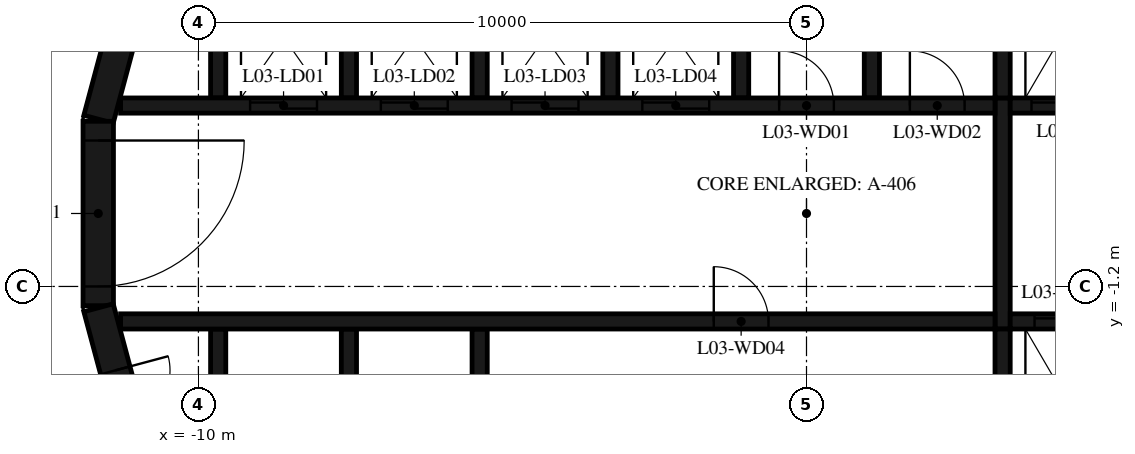
"""IFC4 building model, lengths in metres.
Left out: names, types, materials, properties, quantities, classifications, styles, units other than length and angle.
Written with IfcOpenShell. Run it as: python <this file> out.ifc"""

import sys

from ifc_helpers import new_model, si_unit, direction, frame, frame_2d, origin, place, context, subcontext, project, spatial, polyline, rectangle, outline, extrude, element, fill, save


model = new_model("IFC4")
c1 = context("Model", 3, precision=1e-05, world=origin(), true_north=direction((0.0, 1.0)))
c2 = subcontext(c1, "Body", "Model", "MODEL_VIEW")
j1 = project(units=[si_unit("LENGTHUNIT", "METRE"), si_unit("PLANEANGLEUNIT", "RADIAN")], contexts=[c1])
p1 = place(None, origin())
s1 = spatial("IfcSite", under=j1, at=p1, CompositionType="ELEMENT")
p2 = place(p1, origin())
s2 = spatial("IfcBuilding", under=s1, at=p2, CompositionType="ELEMENT")
p3 = place(p2, frame((0.0, 0.0, 18.6)))
s3 = spatial("IfcBuildingStorey", under=s2, at=p3, CompositionType="ELEMENT", Elevation=18.6)
p4 = place(p3, frame((-10.858, 4.479, 0.0), z_axis=(0.0, 0.0, 1.0), x_axis=(-0.258734743916, -0.965948410781, 0.0)))
e1 = element("IfcWall", 1, at=p4, inside=s3, PredefinedType="SHEAR", context=c2, shape_type="SweptSolid", body=[
    extrude(rectangle(XDim=3.033, YDim=0.5, at=frame_2d((1.516, 0.0))), origin(), (0.0, 0.0, 1.0), 4.42),
])
p5 = place(p3, frame((-11.647, 1.516, 0.0), z_axis=(0.0, 0.0, 1.0), x_axis=(0.0, -1.0, 0.0)))
e2 = element("IfcWall", 2, at=p5, inside=s3, PredefinedType="SHEAR", context=c2, shape_type="SweptSolid", body=[
    extrude(rectangle(XDim=3.033, YDim=0.5, at=frame_2d((1.516, 0.0))), origin(), (0.0, 0.0, 1.0), 4.42),
])
p6 = place(p5, frame((0.316, 0.0, 0.0)))
e3 = element("IfcOpeningElement", 3, at=p6, cuts=e2, PredefinedType="OPENING", context=c2, shape_type="SweptSolid", body=[
    extrude(rectangle(XDim=2.4, YDim=2.1, at=frame_2d((1.2, 1.05))), frame((0.0, 0.26, 0.0), z_axis=(0.0, -1.0, 0.0), x_axis=(1.0, 0.0, 0.0)), (0.0, 0.0, 1.0), 0.52),
])
p7 = place(p3, frame((-11.643, -1.55, 0.0), z_axis=(0.0, 0.0, 1.0), x_axis=(0.258734743916, -0.965948410781, 0.0)))
e4 = element("IfcWall", 4, at=p7, inside=s3, PredefinedType="SHEAR", context=c2, shape_type="SweptSolid", body=[
    extrude(rectangle(XDim=3.033, YDim=0.5, at=frame_2d((1.516, 0.0))), origin(), (0.0, 0.0, 1.0), 4.42),
])
p8 = place(p7, frame((1.066, 0.0, 0.0)))
e5 = element("IfcOpeningElement", 5, at=p8, cuts=e4, PredefinedType="OPENING", context=c2, shape_type="SweptSolid", body=[
    extrude(rectangle(XDim=0.9, YDim=2.1, at=frame_2d((0.45, 1.05))), frame((0.0, 0.26, 0.0), z_axis=(0.0, -1.0, 0.0), x_axis=(1.0, 0.0, 0.0)), (0.0, 0.0, 1.0), 0.52),
])
p9 = place(p3, origin())
e6 = element("IfcWall", 6, at=p9, inside=s3, PredefinedType="SHEAR", context=c2, shape_type="SweptSolid", body=[
    extrude(outline(polyline([(-9.55, 4.8), (-7.65, 4.8), (-7.65, 1.9), (-7.4, 1.9), (-7.4, 4.8), (-5.5, 4.8), (-5.5, 1.9), (-5.25, 1.9), (-5.25, 4.8), (-3.35, 4.8), (-3.35, 1.9), (-3.1, 1.9), (-3.1, 4.8), (-1.2, 4.8), (-1.2, 1.9), (-0.95, 1.9), (-0.95, 4.8), (0.95, 4.8), (0.95, 1.9), (1.2, 1.9), (1.2, 4.8), (3.1, 4.8), (3.1, 1.9), (3.35, 1.9), (3.35, 4.8), (5.25, 4.8), (5.25, 1.9), (5.5, 1.9), (5.5, 4.8), (7.4, 4.8), (7.4, 1.9), (7.65, 1.9), (7.65, 4.8), (9.55, 4.8), (9.55, 1.9), (9.8, 1.9), (9.8, 4.8), (9.8, 5.05), (-9.8, 5.05), (-9.8, 4.8), (-9.8, 1.9), (-9.55, 1.9), (-9.55, 4.8)])), origin(), (0.0, 0.0, 1.0), 4.42),
])
p10 = place(p3, origin())
e7 = element("IfcWall", 7, at=p10, inside=s3, PredefinedType="SHEAR", context=c2, shape_type="SweptSolid", body=[
    extrude(outline(polyline([(9.8, -5.05), (9.8, -4.8), (9.8, -1.9), (9.55, -1.9), (9.55, -4.8), (7.65, -4.8), (7.65, -1.9), (7.4, -1.9), (7.4, -4.8), (5.5, -4.8), (5.5, -1.9), (5.25, -1.9), (5.25, -4.8), (3.35, -4.8), (3.35, -1.9), (3.1, -1.9), (3.1, -4.8), (-5.25, -4.8), (-5.25, -1.9), (-5.5, -1.9), (-5.5, -4.8), (-7.4, -4.8), (-7.4, -1.9), (-7.65, -1.9), (-7.65, -4.8), (-9.55, -4.8), (-9.55, -1.9), (-9.8, -1.9), (-9.8, -4.8), (-9.8, -5.05), (9.8, -5.05)])), origin(), (0.0, 0.0, 1.0), 4.42),
])
p11 = place(p3, frame((-11.28, 1.775, 0.0), z_axis=(0.0, 0.0, 1.0), x_axis=(1.0, 0.0, 0.0)))
e8 = element("IfcWall", 8, at=p11, inside=s3, PredefinedType="SHEAR", context=c2, shape_type="SweptSolid", body=[
    extrude(rectangle(XDim=14.38, YDim=0.25, at=frame_2d((7.19, 0.0))), origin(), (0.0, 0.0, 1.0), 4.42),
])
p12 = place(p11, frame((2.13, 0.0, 0.0)))
e9 = element("IfcOpeningElement", 9, at=p12, cuts=e8, PredefinedType="OPENING", context=c2, shape_type="SweptSolid", body=[
    extrude(rectangle(XDim=1.1, YDim=2.1, at=frame_2d((0.55, 1.05))), frame((0.0, 0.135, 0.0), z_axis=(0.0, -1.0, 0.0), x_axis=(1.0, 0.0, 0.0)), (0.0, 0.0, 1.0), 0.27),
])
p13 = place(p11, frame((4.28, 0.0, 0.0)))
e10 = element("IfcOpeningElement", 10, at=p13, cuts=e8, PredefinedType="OPENING", context=c2, shape_type="SweptSolid", body=[
    extrude(rectangle(XDim=1.1, YDim=2.1, at=frame_2d((0.55, 1.05))), frame((0.0, 0.135, 0.0), z_axis=(0.0, -1.0, 0.0), x_axis=(1.0, 0.0, 0.0)), (0.0, 0.0, 1.0), 0.27),
])
p14 = place(p11, frame((6.43, 0.0, 0.0)))
e11 = element("IfcOpeningElement", 11, at=p14, cuts=e8, PredefinedType="OPENING", context=c2, shape_type="SweptSolid", body=[
    extrude(rectangle(XDim=1.1, YDim=2.1, at=frame_2d((0.55, 1.05))), frame((0.0, 0.135, 0.0), z_axis=(0.0, -1.0, 0.0), x_axis=(1.0, 0.0, 0.0)), (0.0, 0.0, 1.0), 0.27),
])
p15 = place(p11, frame((8.58, 0.0, 0.0)))
e12 = element("IfcOpeningElement", 12, at=p15, cuts=e8, PredefinedType="OPENING", context=c2, shape_type="SweptSolid", body=[
    extrude(rectangle(XDim=1.1, YDim=2.1, at=frame_2d((0.55, 1.05))), frame((0.0, 0.135, 0.0), z_axis=(0.0, -1.0, 0.0), x_axis=(1.0, 0.0, 0.0)), (0.0, 0.0, 1.0), 0.27),
])
p16 = place(p11, frame((10.83, 0.0, 0.0)))
e13 = element("IfcOpeningElement", 13, at=p16, cuts=e8, PredefinedType="OPENING", context=c2, shape_type="SweptSolid", body=[
    extrude(rectangle(XDim=0.9, YDim=2.1, at=frame_2d((0.45, 1.05))), frame((0.0, 0.135, 0.0), z_axis=(0.0, -1.0, 0.0), x_axis=(1.0, 0.0, 0.0)), (0.0, 0.0, 1.0), 0.27),
])
p17 = place(p11, frame((12.98, 0.0, 0.0)))
e14 = element("IfcOpeningElement", 14, at=p17, cuts=e8, PredefinedType="OPENING", context=c2, shape_type="SweptSolid", body=[
    extrude(rectangle(XDim=0.9, YDim=2.1, at=frame_2d((0.45, 1.05))), frame((0.0, 0.135, 0.0), z_axis=(0.0, -1.0, 0.0), x_axis=(1.0, 0.0, 0.0)), (0.0, 0.0, 1.0), 0.27),
])
p18 = place(p3, frame((3.35, 1.775, 0.0), z_axis=(0.0, 0.0, 1.0), x_axis=(1.0, 0.0, 0.0)))
e15 = element("IfcWall", 15, at=p18, inside=s3, PredefinedType="SHEAR", context=c2, shape_type="SweptSolid", body=[
    extrude(rectangle(XDim=7.93, YDim=0.25, at=frame_2d((3.965, 0.0))), origin(), (0.0, 0.0, 1.0), 4.42),
])
p19 = place(p18, frame((0.35, 0.0, 0.0)))
e16 = element("IfcOpeningElement", 16, at=p19, cuts=e15, PredefinedType="OPENING", context=c2, shape_type="SweptSolid", body=[
    extrude(rectangle(XDim=1.2, YDim=2.4, at=frame_2d((0.6, 1.2))), frame((0.0, 0.135, 0.0), z_axis=(0.0, -1.0, 0.0), x_axis=(1.0, 0.0, 0.0)), (0.0, 0.0, 1.0), 0.27),
])
p20 = place(p18, frame((2.5, 0.0, 0.0)))
e17 = element("IfcOpeningElement", 17, at=p20, cuts=e15, PredefinedType="OPENING", context=c2, shape_type="SweptSolid", body=[
    extrude(rectangle(XDim=1.2, YDim=2.4, at=frame_2d((0.6, 1.2))), frame((0.0, 0.135, 0.0), z_axis=(0.0, -1.0, 0.0), x_axis=(1.0, 0.0, 0.0)), (0.0, 0.0, 1.0), 0.27),
])
p21 = place(p18, frame((4.8, 0.0, 0.0)))
e18 = element("IfcOpeningElement", 18, at=p21, cuts=e15, PredefinedType="OPENING", context=c2, shape_type="SweptSolid", body=[
    extrude(rectangle(XDim=0.9, YDim=2.1, at=frame_2d((0.45, 1.05))), frame((0.0, 0.135, 0.0), z_axis=(0.0, -1.0, 0.0), x_axis=(1.0, 0.0, 0.0)), (0.0, 0.0, 1.0), 0.27),
])
p22 = place(p3, frame((-11.28, -1.775, 0.0), z_axis=(0.0, 0.0, 1.0), x_axis=(1.0, 0.0, 0.0)))
e19 = element("IfcWall", 19, at=p22, inside=s3, PredefinedType="SHEAR", context=c2, shape_type="SweptSolid", body=[
    extrude(rectangle(XDim=14.38, YDim=0.25, at=frame_2d((7.19, 0.0))), origin(), (0.0, 0.0, 1.0), 4.42),
])
p23 = place(p22, frame((9.755, 0.0, 0.0)))
e20 = element("IfcOpeningElement", 20, at=p23, cuts=e19, PredefinedType="OPENING", context=c2, shape_type="SweptSolid", body=[
    extrude(rectangle(XDim=0.9, YDim=2.1, at=frame_2d((0.45, 1.05))), frame((0.0, 0.135, 0.0), z_axis=(0.0, -1.0, 0.0), x_axis=(1.0, 0.0, 0.0)), (0.0, 0.0, 1.0), 0.27),
])
p24 = place(p3, frame((3.35, -1.775, 0.0), z_axis=(0.0, 0.0, 1.0), x_axis=(1.0, 0.0, 0.0)))
e21 = element("IfcWall", 21, at=p24, inside=s3, PredefinedType="SHEAR", context=c2, shape_type="SweptSolid", body=[
    extrude(rectangle(XDim=7.93, YDim=0.25, at=frame_2d((3.965, 0.0))), origin(), (0.0, 0.0, 1.0), 4.42),
])
p25 = place(p24, frame((0.4, 0.0, 0.0)))
e22 = element("IfcOpeningElement", 22, at=p25, cuts=e21, PredefinedType="OPENING", context=c2, shape_type="SweptSolid", body=[
    extrude(rectangle(XDim=1.1, YDim=2.4, at=frame_2d((0.55, 1.2))), frame((0.0, 0.135, 0.0), z_axis=(0.0, -1.0, 0.0), x_axis=(1.0, 0.0, 0.0)), (0.0, 0.0, 1.0), 0.27),
])
p26 = place(p24, frame((2.55, 0.0, 0.0)))
e23 = element("IfcOpeningElement", 23, at=p26, cuts=e21, PredefinedType="OPENING", context=c2, shape_type="SweptSolid", body=[
    extrude(rectangle(XDim=1.1, YDim=2.4, at=frame_2d((0.55, 1.2))), frame((0.0, 0.135, 0.0), z_axis=(0.0, -1.0, 0.0), x_axis=(1.0, 0.0, 0.0)), (0.0, 0.0, 1.0), 0.27),
])
p27 = place(p24, frame((4.7, 0.0, 0.0)))
e24 = element("IfcOpeningElement", 24, at=p27, cuts=e21, PredefinedType="OPENING", context=c2, shape_type="SweptSolid", body=[
    extrude(rectangle(XDim=1.1, YDim=2.4, at=frame_2d((0.55, 1.2))), frame((0.0, 0.135, 0.0), z_axis=(0.0, -1.0, 0.0), x_axis=(1.0, 0.0, 0.0)), (0.0, 0.0, 1.0), 0.27),
])
p28 = place(p3, frame((3.225, -1.9, 0.0), z_axis=(0.0, 0.0, 1.0), x_axis=(0.0, 1.0, 0.0)))
e25 = element("IfcWall", 25, at=p28, inside=s3, PredefinedType="SHEAR", context=c2, shape_type="SweptSolid", body=[
    extrude(rectangle(XDim=3.8, YDim=0.25, at=frame_2d((1.9, 0.0))), origin(), (0.0, 0.0, 1.0), 4.42),
])
p29 = place(p6, origin())
e26 = element("IfcDoor", 26, at=p29, inside=s3, OperationType="DOUBLE_DOOR_SINGLE_SWING", PredefinedType="DOOR", context=c2, shape_type="SweptSolid", body=[
    extrude(rectangle(XDim=2.4, YDim=2.1, at=frame_2d((1.2, 1.05))), frame((0.0, 0.025, 0.0), z_axis=(0.0, -1.0, 0.0), x_axis=(1.0, 0.0, 0.0)), (0.0, 0.0, 1.0), 0.05),
])
fill(e3, e26)
p30 = place(p12, origin())
e27 = element("IfcDoor", 27, at=p30, inside=s3, OperationType="DOUBLE_DOOR_SLIDING", PredefinedType="DOOR", context=c2, shape_type="SweptSolid", body=[
    extrude(rectangle(XDim=1.1, YDim=2.1, at=frame_2d((0.55, 1.05))), frame((0.0, 0.025, 0.0), z_axis=(0.0, -1.0, 0.0), x_axis=(1.0, 0.0, 0.0)), (0.0, 0.0, 1.0), 0.05),
])
fill(e9, e27)
p31 = place(p13, origin())
e28 = element("IfcDoor", 28, at=p31, inside=s3, OperationType="DOUBLE_DOOR_SLIDING", PredefinedType="DOOR", context=c2, shape_type="SweptSolid", body=[
    extrude(rectangle(XDim=1.1, YDim=2.1, at=frame_2d((0.55, 1.05))), frame((0.0, 0.025, 0.0), z_axis=(0.0, -1.0, 0.0), x_axis=(1.0, 0.0, 0.0)), (0.0, 0.0, 1.0), 0.05),
])
fill(e10, e28)
p32 = place(p14, origin())
e29 = element("IfcDoor", 29, at=p32, inside=s3, OperationType="DOUBLE_DOOR_SLIDING", PredefinedType="DOOR", context=c2, shape_type="SweptSolid", body=[
    extrude(rectangle(XDim=1.1, YDim=2.1, at=frame_2d((0.55, 1.05))), frame((0.0, 0.025, 0.0), z_axis=(0.0, -1.0, 0.0), x_axis=(1.0, 0.0, 0.0)), (0.0, 0.0, 1.0), 0.05),
])
fill(e11, e29)
p33 = place(p15, origin())
e30 = element("IfcDoor", 30, at=p33, inside=s3, OperationType="DOUBLE_DOOR_SLIDING", PredefinedType="DOOR", context=c2, shape_type="SweptSolid", body=[
    extrude(rectangle(XDim=1.1, YDim=2.1, at=frame_2d((0.55, 1.05))), frame((0.0, 0.025, 0.0), z_axis=(0.0, -1.0, 0.0), x_axis=(1.0, 0.0, 0.0)), (0.0, 0.0, 1.0), 0.05),
])
fill(e12, e30)
p34 = place(p19, origin())
e31 = element("IfcDoor", 31, at=p34, inside=s3, OperationType="DOUBLE_DOOR_SLIDING", PredefinedType="DOOR", context=c2, shape_type="SweptSolid", body=[
    extrude(rectangle(XDim=1.2, YDim=2.4, at=frame_2d((0.6, 1.2))), frame((0.0, 0.025, 0.0), z_axis=(0.0, -1.0, 0.0), x_axis=(1.0, 0.0, 0.0)), (0.0, 0.0, 1.0), 0.05),
])
fill(e16, e31)
p35 = place(p25, origin())
e32 = element("IfcDoor", 32, at=p35, inside=s3, OperationType="DOUBLE_DOOR_SLIDING", PredefinedType="DOOR", context=c2, shape_type="SweptSolid", body=[
    extrude(rectangle(XDim=1.1, YDim=2.4, at=frame_2d((0.55, 1.2))), frame((0.0, 0.025, 0.0), z_axis=(0.0, -1.0, 0.0), x_axis=(1.0, 0.0, 0.0)), (0.0, 0.0, 1.0), 0.05),
])
fill(e22, e32)
p36 = place(p16, origin())
e33 = element("IfcDoor", 33, at=p36, inside=s3, OperationType="SINGLE_SWING_RIGHT", PredefinedType="DOOR", context=c2, shape_type="SweptSolid", body=[
    extrude(rectangle(XDim=0.9, YDim=2.1, at=frame_2d((0.45, 1.05))), frame((0.0, 0.025, 0.0), z_axis=(0.0, -1.0, 0.0), x_axis=(1.0, 0.0, 0.0)), (0.0, 0.0, 1.0), 0.05),
])
fill(e13, e33)
p37 = place(p17, origin())
e34 = element("IfcDoor", 34, at=p37, inside=s3, OperationType="SINGLE_SWING_LEFT", PredefinedType="DOOR", context=c2, shape_type="SweptSolid", body=[
    extrude(rectangle(XDim=0.9, YDim=2.1, at=frame_2d((0.45, 1.05))), frame((0.0, 0.025, 0.0), z_axis=(0.0, -1.0, 0.0), x_axis=(1.0, 0.0, 0.0)), (0.0, 0.0, 1.0), 0.05),
])
fill(e14, e34)
p38 = place(p23, origin())
e35 = element("IfcDoor", 35, at=p38, inside=s3, OperationType="SINGLE_SWING_LEFT", PredefinedType="DOOR", context=c2, shape_type="SweptSolid", body=[
    extrude(rectangle(XDim=0.9, YDim=2.1, at=frame_2d((0.45, 1.05))), frame((0.0, 0.025, 0.0), z_axis=(0.0, -1.0, 0.0), x_axis=(1.0, 0.0, 0.0)), (0.0, 0.0, 1.0), 0.05),
])
fill(e20, e35)
p39 = place(p8, origin())
e36 = element("IfcDoor", 36, at=p39, inside=s3, OperationType="SINGLE_SWING_RIGHT", PredefinedType="DOOR", context=c2, shape_type="SweptSolid", body=[
    extrude(rectangle(XDim=0.9, YDim=2.1, at=frame_2d((0.45, 1.05))), frame((0.0, 0.025, 0.0), z_axis=(0.0, -1.0, 0.0), x_axis=(1.0, 0.0, 0.0)), (0.0, 0.0, 1.0), 0.05),
])
fill(e5, e36)
save(model, sys.argv[1])
